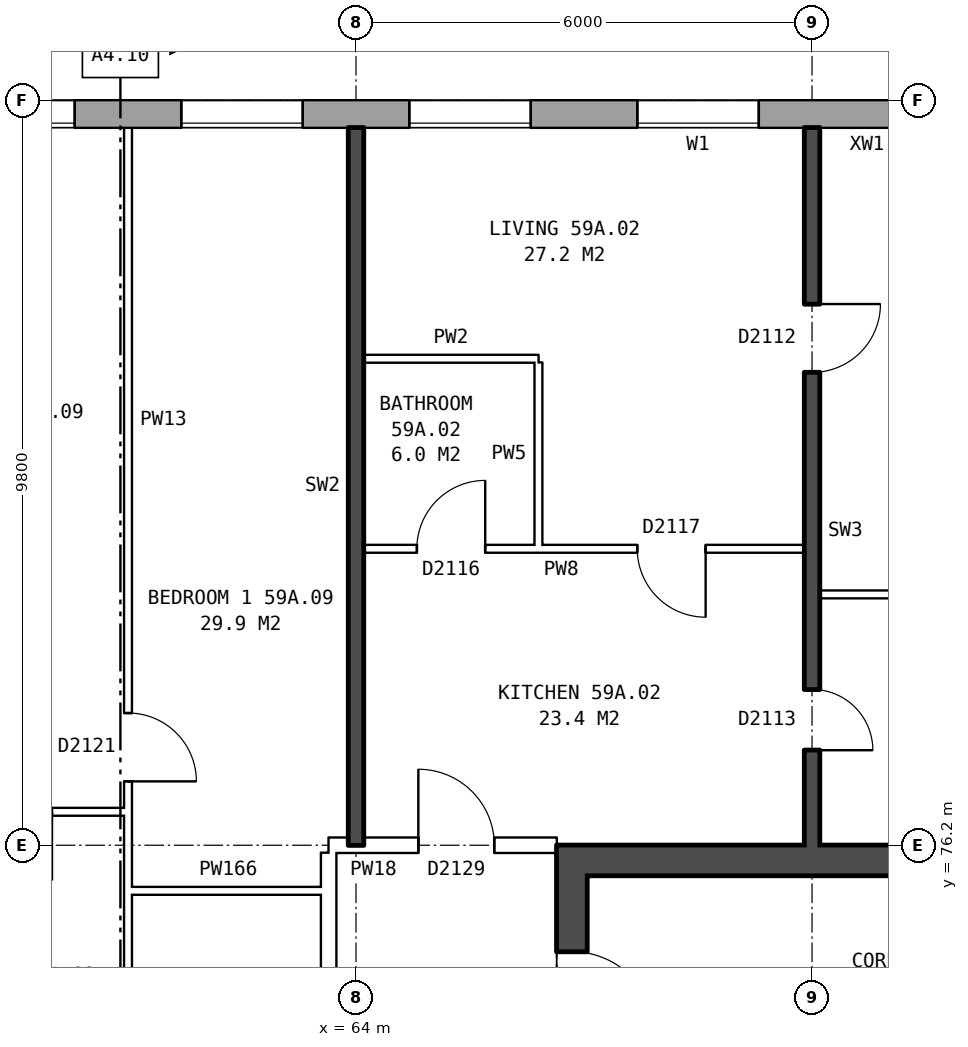
"""IFC4 building model, lengths in metres.
Left out: names, types, materials, properties, quantities, classifications, styles, units other than length and angle.
Written with IfcOpenShell. Run it as: python <this file> out.ifc"""

import sys

from ifc_helpers import new_model, si_unit, direction, frame, frame_2d, origin, place, context, subcontext, project, spatial, rectangle, extrude, element, fill, save


model = new_model("IFC4")
c1 = context("Model", 3, precision=1e-05, world=origin(), true_north=direction((0.0, 1.0)))
c2 = subcontext(c1, "Body", "Model", "MODEL_VIEW")
j1 = project(units=[si_unit("LENGTHUNIT", "METRE"), si_unit("PLANEANGLEUNIT", "RADIAN")], contexts=[c1])
p1 = place(None, origin())
s1 = spatial("IfcSite", under=j1, at=p1, CompositionType="ELEMENT")
p2 = place(p1, origin())
s2 = spatial("IfcBuilding", under=s1, at=p2, CompositionType="ELEMENT")
p3 = place(p2, frame((0.0, 0.0, 209.0)))
s3 = spatial("IfcBuildingStorey", under=s2, at=p3, CompositionType="ELEMENT", Elevation=209.0)
p4 = place(p3, frame((74.95, 85.82, 0.0), z_axis=(0.0, 0.0, 1.0), x_axis=(-1.0, 0.0, 0.0)))
e1 = element("IfcWall", 1, at=p4, inside=s3, PredefinedType="STANDARD", context=c2, shape_type="SweptSolid", body=[
    extrude(rectangle(XDim=39.875, YDim=0.36, at=frame_2d((19.938, 0.0))), origin(), (0.0, 0.0, 1.0), 2.85),
])
p5 = place(p4, frame((0.3, 0.0, 0.8)))
e2 = element("IfcOpeningElement", 2, at=p5, cuts=e1, PredefinedType="OPENING", context=c2, shape_type="SweptSolid", body=[
    extrude(rectangle(XDim=0.8, YDim=1.5, at=frame_2d((0.4, 0.75))), frame((0.0, 0.19, 0.0), z_axis=(0.0, -1.0, 0.0), x_axis=(1.0, 0.0, 0.0)), (0.0, 0.0, 1.0), 0.38),
])
p6 = place(p4, frame((5.65, 0.0, 0.8)))
e3 = element("IfcOpeningElement", 3, at=p6, cuts=e1, PredefinedType="OPENING", context=c2, shape_type="SweptSolid", body=[
    extrude(rectangle(XDim=1.6, YDim=1.8, at=frame_2d((0.8, 0.9))), frame((0.0, 0.19, 0.0), z_axis=(0.0, -1.0, 0.0), x_axis=(1.0, 0.0, 0.0)), (0.0, 0.0, 1.0), 0.38),
])
p7 = place(p4, frame((8.65, 0.0, 0.8)))
e4 = element("IfcOpeningElement", 4, at=p7, cuts=e1, PredefinedType="OPENING", context=c2, shape_type="SweptSolid", body=[
    extrude(rectangle(XDim=1.6, YDim=1.8, at=frame_2d((0.8, 0.9))), frame((0.0, 0.19, 0.0), z_axis=(0.0, -1.0, 0.0), x_axis=(1.0, 0.0, 0.0)), (0.0, 0.0, 1.0), 0.38),
])
p8 = place(p4, frame((11.65, 0.0, 0.8)))
e5 = element("IfcOpeningElement", 5, at=p8, cuts=e1, PredefinedType="OPENING", context=c2, shape_type="SweptSolid", body=[
    extrude(rectangle(XDim=1.6, YDim=1.8, at=frame_2d((0.8, 0.9))), frame((0.0, 0.19, 0.0), z_axis=(0.0, -1.0, 0.0), x_axis=(1.0, 0.0, 0.0)), (0.0, 0.0, 1.0), 0.38),
])
p9 = place(p4, frame((14.65, 0.0, 0.8)))
e6 = element("IfcOpeningElement", 6, at=p9, cuts=e1, PredefinedType="OPENING", context=c2, shape_type="SweptSolid", body=[
    extrude(rectangle(XDim=1.6, YDim=1.8, at=frame_2d((0.8, 0.9))), frame((0.0, 0.19, 0.0), z_axis=(0.0, -1.0, 0.0), x_axis=(1.0, 0.0, 0.0)), (0.0, 0.0, 1.0), 0.38),
])
p10 = place(p4, frame((17.65, 0.0, 0.8)))
e7 = element("IfcOpeningElement", 7, at=p10, cuts=e1, PredefinedType="OPENING", context=c2, shape_type="SweptSolid", body=[
    extrude(rectangle(XDim=1.6, YDim=1.8, at=frame_2d((0.8, 0.9))), frame((0.0, 0.19, 0.0), z_axis=(0.0, -1.0, 0.0), x_axis=(1.0, 0.0, 0.0)), (0.0, 0.0, 1.0), 0.38),
])
p11 = place(p4, frame((20.65, 0.0, 0.8)))
e8 = element("IfcOpeningElement", 8, at=p11, cuts=e1, PredefinedType="OPENING", context=c2, shape_type="SweptSolid", body=[
    extrude(rectangle(XDim=1.6, YDim=1.8, at=frame_2d((0.8, 0.9))), frame((0.0, 0.19, 0.0), z_axis=(0.0, -1.0, 0.0), x_axis=(1.0, 0.0, 0.0)), (0.0, 0.0, 1.0), 0.38),
])
p12 = place(p4, frame((23.65, 0.0, 0.8)))
e9 = element("IfcOpeningElement", 9, at=p12, cuts=e1, PredefinedType="OPENING", context=c2, shape_type="SweptSolid", body=[
    extrude(rectangle(XDim=1.6, YDim=1.8, at=frame_2d((0.8, 0.9))), frame((0.0, 0.19, 0.0), z_axis=(0.0, -1.0, 0.0), x_axis=(1.0, 0.0, 0.0)), (0.0, 0.0, 1.0), 0.38),
])
p13 = place(p4, frame((26.65, 0.0, 0.8)))
e10 = element("IfcOpeningElement", 10, at=p13, cuts=e1, PredefinedType="OPENING", context=c2, shape_type="SweptSolid", body=[
    extrude(rectangle(XDim=1.6, YDim=1.8, at=frame_2d((0.8, 0.9))), frame((0.0, 0.19, 0.0), z_axis=(0.0, -1.0, 0.0), x_axis=(1.0, 0.0, 0.0)), (0.0, 0.0, 1.0), 0.38),
])
p14 = place(p4, frame((29.65, 0.0, 0.8)))
e11 = element("IfcOpeningElement", 11, at=p14, cuts=e1, PredefinedType="OPENING", context=c2, shape_type="SweptSolid", body=[
    extrude(rectangle(XDim=1.6, YDim=1.8, at=frame_2d((0.8, 0.9))), frame((0.0, 0.19, 0.0), z_axis=(0.0, -1.0, 0.0), x_axis=(1.0, 0.0, 0.0)), (0.0, 0.0, 1.0), 0.38),
])
p15 = place(p4, frame((32.65, 0.0, 0.8)))
e12 = element("IfcOpeningElement", 12, at=p15, cuts=e1, PredefinedType="OPENING", context=c2, shape_type="SweptSolid", body=[
    extrude(rectangle(XDim=1.6, YDim=1.8, at=frame_2d((0.8, 0.9))), frame((0.0, 0.19, 0.0), z_axis=(0.0, -1.0, 0.0), x_axis=(1.0, 0.0, 0.0)), (0.0, 0.0, 1.0), 0.38),
])
p16 = place(p4, frame((35.15, 0.0, 0.8)))
e13 = element("IfcOpeningElement", 13, at=p16, cuts=e1, PredefinedType="OPENING", context=c2, shape_type="SweptSolid", body=[
    extrude(rectangle(XDim=1.0, YDim=1.8, at=frame_2d((0.5, 0.9))), frame((0.0, 0.19, 0.0), z_axis=(0.0, -1.0, 0.0), x_axis=(1.0, 0.0, 0.0)), (0.0, 0.0, 1.0), 0.38),
])
p17 = place(p4, frame((1.4, 0.0, 0.8)))
e14 = element("IfcOpeningElement", 14, at=p17, cuts=e1, PredefinedType="OPENING", context=c2, shape_type="SweptSolid", body=[
    extrude(rectangle(XDim=1.4, YDim=1.8, at=frame_2d((0.7, 0.9))), frame((0.0, 0.19, 0.0), z_axis=(0.0, -1.0, 0.0), x_axis=(1.0, 0.0, 0.0)), (0.0, 0.0, 1.0), 0.38),
])
p18 = place(p4, frame((38.55, 0.0, 0.8)))
e15 = element("IfcOpeningElement", 15, at=p18, cuts=e1, PredefinedType="OPENING", context=c2, shape_type="SweptSolid", body=[
    extrude(rectangle(XDim=1.0, YDim=1.8, at=frame_2d((0.5, 0.9))), frame((0.0, 0.19, 0.0), z_axis=(0.0, -1.0, 0.0), x_axis=(1.0, 0.0, 0.0)), (0.0, 0.0, 1.0), 0.38),
])
p19 = place(p3, frame((66.84, 63.8, 0.0), z_axis=(0.0, 0.0, 1.0), x_axis=(0.0, 1.0, 0.0)))
e16 = element("IfcWall", 16, at=p19, inside=s3, PredefinedType="SHEAR", context=c2, shape_type="SweptSolid", body=[
    extrude(rectangle(XDim=12.4, YDim=0.4, at=frame_2d((6.2, 0.0))), origin(), (0.0, 0.0, 1.0), 2.85),
])
p20 = place(p19, frame((1.325, 0.0, 0.0)))
e17 = element("IfcOpeningElement", 17, at=p20, cuts=e16, PredefinedType="OPENING", context=c2, shape_type="SweptSolid", body=[
    extrude(rectangle(XDim=1.1, YDim=2.1, at=frame_2d((0.55, 1.05))), frame((0.0, 0.21, 0.0), z_axis=(0.0, -1.0, 0.0), x_axis=(1.0, 0.0, 0.0)), (0.0, 0.0, 1.0), 0.42),
])
p21 = place(p19, frame((3.6, 0.0, 0.0)))
e18 = element("IfcOpeningElement", 18, at=p21, cuts=e16, PredefinedType="OPENING", context=c2, shape_type="SweptSolid", body=[
    extrude(rectangle(XDim=1.1, YDim=2.1, at=frame_2d((0.55, 1.05))), frame((0.0, 0.21, 0.0), z_axis=(0.0, -1.0, 0.0), x_axis=(1.0, 0.0, 0.0)), (0.0, 0.0, 1.0), 0.42),
])
p22 = place(p19, frame((5.8, 0.0, 0.0)))
e19 = element("IfcOpeningElement", 19, at=p22, cuts=e16, PredefinedType="OPENING", context=c2, shape_type="SweptSolid", body=[
    extrude(rectangle(XDim=1.1, YDim=2.1, at=frame_2d((0.55, 1.05))), frame((0.0, 0.21, 0.0), z_axis=(0.0, -1.0, 0.0), x_axis=(1.0, 0.0, 0.0)), (0.0, 0.0, 1.0), 0.42),
])
p23 = place(p19, frame((8.0, 0.0, 0.0)))
e20 = element("IfcOpeningElement", 20, at=p23, cuts=e16, PredefinedType="OPENING", context=c2, shape_type="SweptSolid", body=[
    extrude(rectangle(XDim=1.1, YDim=2.1, at=frame_2d((0.55, 1.05))), frame((0.0, 0.21, 0.0), z_axis=(0.0, -1.0, 0.0), x_axis=(1.0, 0.0, 0.0)), (0.0, 0.0, 1.0), 0.42),
])
p24 = place(p19, frame((9.9, 0.0, 0.0)))
e21 = element("IfcOpeningElement", 21, at=p24, cuts=e16, PredefinedType="OPENING", context=c2, shape_type="SweptSolid", body=[
    extrude(rectangle(XDim=1.1, YDim=2.1, at=frame_2d((0.55, 1.05))), frame((0.0, 0.21, 0.0), z_axis=(0.0, -1.0, 0.0), x_axis=(1.0, 0.0, 0.0)), (0.0, 0.0, 1.0), 0.42),
])
p25 = place(p3, frame((67.04, 76.0, 0.0), z_axis=(0.0, 0.0, 1.0), x_axis=(1.0, 0.0, 0.0)))
e22 = element("IfcWall", 22, at=p25, inside=s3, PredefinedType="SHEAR", context=c2, shape_type="SweptSolid", body=[
    extrude(rectangle(XDim=8.2, YDim=0.4, at=frame_2d((4.1, 0.0))), origin(), (0.0, 0.0, 1.0), 2.85),
])
p26 = place(p3, frame((63.64, 63.9, 0.0), z_axis=(0.0, 0.0, 1.0), x_axis=(0.0, 1.0, 0.0)))
e23 = element("IfcWall", 23, at=p26, inside=s3, PredefinedType="PARTITIONING", context=c2, shape_type="SweptSolid", body=[
    extrude(rectangle(XDim=12.2, YDim=0.2, at=frame_2d((6.1, 0.0))), origin(), (0.0, 0.0, 1.0), 2.85),
])
p27 = place(p26, frame((5.1, 0.0, 0.0)))
e24 = element("IfcOpeningElement", 24, at=p27, cuts=e23, PredefinedType="OPENING", context=c2, shape_type="SweptSolid", body=[
    extrude(rectangle(XDim=2.0, YDim=2.1, at=frame_2d((1.0, 1.05))), frame((0.0, 0.11, 0.0), z_axis=(0.0, -1.0, 0.0), x_axis=(1.0, 0.0, 0.0)), (0.0, 0.0, 1.0), 0.22),
])
p28 = place(p3, frame((61.0, 75.6, 0.0), z_axis=(0.0, 0.0, 1.0), x_axis=(1.0, 0.0, 0.0)))
e25 = element("IfcWall", 25, at=p28, inside=s3, PredefinedType="PARTITIONING", context=c2, shape_type="SweptSolid", body=[
    extrude(rectangle(XDim=2.64, YDim=0.1, at=frame_2d((1.32, 0.0))), origin(), (0.0, 0.0, 1.0), 2.85),
])
p29 = place(p3, frame((63.64, 76.2, 0.0), z_axis=(0.0, 0.0, 1.0), x_axis=(1.0, 0.0, 0.0)))
e26 = element("IfcWall", 26, at=p29, inside=s3, PredefinedType="PARTITIONING", context=c2, shape_type="SweptSolid", body=[
    extrude(rectangle(XDim=3.0, YDim=0.2, at=frame_2d((1.5, 0.0))), origin(), (0.0, 0.0, 1.0), 2.85),
])
p30 = place(p29, frame((1.18, 0.0, 0.0)))
e27 = element("IfcOpeningElement", 27, at=p30, cuts=e26, PredefinedType="OPENING", context=c2, shape_type="SweptSolid", body=[
    extrude(rectangle(XDim=1.0, YDim=2.1, at=frame_2d((0.5, 1.05))), frame((0.0, 0.11, 0.0), z_axis=(0.0, -1.0, 0.0), x_axis=(1.0, 0.0, 0.0)), (0.0, 0.0, 1.0), 0.22),
])
p31 = place(p3, frame((58.1, 76.64, 0.0), z_axis=(0.0, 0.0, 1.0), x_axis=(1.0, 0.0, 0.0)))
e28 = element("IfcWall", 28, at=p31, inside=s3, PredefinedType="PARTITIONING", context=c2, shape_type="SweptSolid", body=[
    extrude(rectangle(XDim=2.9, YDim=0.1, at=frame_2d((1.45, 0.0))), origin(), (0.0, 0.0, 1.0), 2.85),
])
p32 = place(p31, frame((1.0, 0.0, 0.0)))
e29 = element("IfcOpeningElement", 29, at=p32, cuts=e28, PredefinedType="OPENING", context=c2, shape_type="SweptSolid", body=[
    extrude(rectangle(XDim=0.9, YDim=2.1, at=frame_2d((0.45, 1.05))), frame((0.0, 0.06, 0.0), z_axis=(0.0, -1.0, 0.0), x_axis=(1.0, 0.0, 0.0)), (0.0, 0.0, 1.0), 0.12),
])
p33 = place(p3, frame((70.1, 79.5, 0.0), z_axis=(0.0, 0.0, 1.0), x_axis=(1.0, 0.0, 0.0)))
e30 = element("IfcWall", 30, at=p33, inside=s3, PredefinedType="PARTITIONING", context=c2, shape_type="SweptSolid", body=[
    extrude(rectangle(XDim=5.8, YDim=0.1, at=frame_2d((2.9, 0.0))), origin(), (0.0, 0.0, 1.0), 2.85),
])
p34 = place(p3, frame((64.1, 80.1, 0.0), z_axis=(0.0, 0.0, 1.0), x_axis=(1.0, 0.0, 0.0)))
e31 = element("IfcWall", 31, at=p34, inside=s3, PredefinedType="PARTITIONING", context=c2, shape_type="SweptSolid", body=[
    extrude(rectangle(XDim=5.8, YDim=0.1, at=frame_2d((2.9, 0.0))), origin(), (0.0, 0.0, 1.0), 2.85),
])
p35 = place(p34, frame((3.6, 0.0, 0.0)))
e32 = element("IfcOpeningElement", 32, at=p35, cuts=e31, PredefinedType="OPENING", context=c2, shape_type="SweptSolid", body=[
    extrude(rectangle(XDim=0.9, YDim=2.1, at=frame_2d((0.45, 1.05))), frame((0.0, 0.06, 0.0), z_axis=(0.0, -1.0, 0.0), x_axis=(1.0, 0.0, 0.0)), (0.0, 0.0, 1.0), 0.12),
])
p36 = place(p34, frame((0.7, 0.0, 0.0)))
e33 = element("IfcOpeningElement", 33, at=p36, cuts=e31, PredefinedType="OPENING", context=c2, shape_type="SweptSolid", body=[
    extrude(rectangle(XDim=0.9, YDim=2.1, at=frame_2d((0.45, 1.05))), frame((0.0, 0.06, 0.0), z_axis=(0.0, -1.0, 0.0), x_axis=(1.0, 0.0, 0.0)), (0.0, 0.0, 1.0), 0.12),
])
p37 = place(p3, frame((64.1, 82.6, 0.0), z_axis=(0.0, 0.0, 1.0), x_axis=(1.0, 0.0, 0.0)))
e34 = element("IfcWall", 34, at=p37, inside=s3, PredefinedType="PARTITIONING", context=c2, shape_type="SweptSolid", body=[
    extrude(rectangle(XDim=2.3, YDim=0.1, at=frame_2d((1.15, 0.0))), origin(), (0.0, 0.0, 1.0), 2.85),
])
p38 = place(p3, frame((61.0, 71.3, 0.0), z_axis=(0.0, 0.0, 1.0), x_axis=(0.0, 1.0, 0.0)))
e35 = element("IfcWall", 35, at=p38, inside=s3, PredefinedType="PARTITIONING", context=c2, shape_type="SweptSolid", body=[
    extrude(rectangle(XDim=14.34, YDim=0.1, at=frame_2d((7.17, 0.0))), origin(), (0.0, 0.0, 1.0), 2.85),
])
p39 = place(p38, frame((5.74, 0.0, 0.0)))
e36 = element("IfcOpeningElement", 36, at=p39, cuts=e35, PredefinedType="OPENING", context=c2, shape_type="SweptSolid", body=[
    extrude(rectangle(XDim=0.9, YDim=2.1, at=frame_2d((0.45, 1.05))), frame((0.0, 0.06, 0.0), z_axis=(0.0, -1.0, 0.0), x_axis=(1.0, 0.0, 0.0)), (0.0, 0.0, 1.0), 0.12),
])
p40 = place(p38, frame((0.4, 0.0, 0.0)))
e37 = element("IfcOpeningElement", 37, at=p40, cuts=e35, PredefinedType="OPENING", context=c2, shape_type="SweptSolid", body=[
    extrude(rectangle(XDim=0.9, YDim=2.1, at=frame_2d((0.45, 1.05))), frame((0.0, 0.06, 0.0), z_axis=(0.0, -1.0, 0.0), x_axis=(1.0, 0.0, 0.0)), (0.0, 0.0, 1.0), 0.12),
])
p41 = place(p3, frame((64.0, 76.2, 0.0), z_axis=(0.0, 0.0, 1.0), x_axis=(0.0, 1.0, 0.0)))
e38 = element("IfcWall", 38, at=p41, inside=s3, PredefinedType="SOLIDWALL", context=c2, shape_type="SweptSolid", body=[
    extrude(rectangle(XDim=9.44, YDim=0.2, at=frame_2d((4.72, 0.0))), origin(), (0.0, 0.0, 1.0), 2.85),
])
p42 = place(p3, frame((66.4, 80.15, 0.0), z_axis=(0.0, 0.0, 1.0), x_axis=(0.0, 1.0, 0.0)))
e39 = element("IfcWall", 39, at=p42, inside=s3, PredefinedType="PARTITIONING", context=c2, shape_type="SweptSolid", body=[
    extrude(rectangle(XDim=2.4, YDim=0.1, at=frame_2d((1.2, 0.0))), origin(), (0.0, 0.0, 1.0), 2.85),
])
p43 = place(p3, frame((70.0, 76.2, 0.0), z_axis=(0.0, 0.0, 1.0), x_axis=(0.0, 1.0, 0.0)))
e40 = element("IfcWall", 40, at=p43, inside=s3, PredefinedType="SOLIDWALL", context=c2, shape_type="SweptSolid", body=[
    extrude(rectangle(XDim=9.44, YDim=0.2, at=frame_2d((4.72, 0.0))), origin(), (0.0, 0.0, 1.0), 2.85),
])
p44 = place(p43, frame((6.22, 0.0, 0.0)))
e41 = element("IfcOpeningElement", 41, at=p44, cuts=e40, PredefinedType="OPENING", context=c2, shape_type="SweptSolid", body=[
    extrude(rectangle(XDim=0.9, YDim=2.1, at=frame_2d((0.45, 1.05))), frame((0.0, 0.11, 0.0), z_axis=(0.0, -1.0, 0.0), x_axis=(1.0, 0.0, 0.0)), (0.0, 0.0, 1.0), 0.22),
])
p45 = place(p43, frame((1.25, 0.0, 0.0)))
e42 = element("IfcOpeningElement", 42, at=p45, cuts=e40, PredefinedType="OPENING", context=c2, shape_type="SweptSolid", body=[
    extrude(rectangle(XDim=0.8, YDim=2.1, at=frame_2d((0.4, 1.05))), frame((0.0, 0.11, 0.0), z_axis=(0.0, -1.0, 0.0), x_axis=(1.0, 0.0, 0.0)), (0.0, 0.0, 1.0), 0.22),
])
p46 = place(p6, origin())
e43 = element("IfcWindow", 43, at=p46, inside=s3, PartitioningType="SINGLE_PANEL", PredefinedType="WINDOW", context=c2, shape_type="SweptSolid", body=[
    extrude(rectangle(XDim=1.6, YDim=1.8, at=frame_2d((0.8, 0.9))), frame((0.0, 0.15, 0.0), z_axis=(0.0, -1.0, 0.0), x_axis=(1.0, 0.0, 0.0)), (0.0, 0.0, 1.0), 0.06),
])
fill(e3, e43)
p47 = place(p7, origin())
e44 = element("IfcWindow", 44, at=p47, inside=s3, PartitioningType="SINGLE_PANEL", PredefinedType="WINDOW", context=c2, shape_type="SweptSolid", body=[
    extrude(rectangle(XDim=1.6, YDim=1.8, at=frame_2d((0.8, 0.9))), frame((0.0, 0.15, 0.0), z_axis=(0.0, -1.0, 0.0), x_axis=(1.0, 0.0, 0.0)), (0.0, 0.0, 1.0), 0.06),
])
fill(e4, e44)
p48 = place(p8, origin())
e45 = element("IfcWindow", 45, at=p48, inside=s3, PartitioningType="SINGLE_PANEL", PredefinedType="WINDOW", context=c2, shape_type="SweptSolid", body=[
    extrude(rectangle(XDim=1.6, YDim=1.8, at=frame_2d((0.8, 0.9))), frame((0.0, 0.15, 0.0), z_axis=(0.0, -1.0, 0.0), x_axis=(1.0, 0.0, 0.0)), (0.0, 0.0, 1.0), 0.06),
])
fill(e5, e45)
p49 = place(p9, origin())
e46 = element("IfcWindow", 46, at=p49, inside=s3, PartitioningType="SINGLE_PANEL", PredefinedType="WINDOW", context=c2, shape_type="SweptSolid", body=[
    extrude(rectangle(XDim=1.6, YDim=1.8, at=frame_2d((0.8, 0.9))), frame((0.0, 0.15, 0.0), z_axis=(0.0, -1.0, 0.0), x_axis=(1.0, 0.0, 0.0)), (0.0, 0.0, 1.0), 0.06),
])
fill(e6, e46)
p50 = place(p24, frame((1.1, 0.0, 0.0), z_axis=(0.0, 0.0, 1.0), x_axis=(-1.0, 0.0, 0.0)))
e47 = element("IfcDoor", 47, at=p50, inside=s3, OperationType="SINGLE_SWING_RIGHT", PredefinedType="DOOR", context=c2, shape_type="SweptSolid", body=[
    extrude(rectangle(XDim=1.1, YDim=2.1, at=frame_2d((0.55, 1.05))), frame((0.0, 0.185, 0.0), z_axis=(0.0, -1.0, 0.0), x_axis=(1.0, 0.0, 0.0)), (0.0, 0.0, 1.0), 0.05),
])
fill(e21, e47)
p51 = place(p44, frame((0.9, 0.0, 0.0), z_axis=(0.0, 0.0, 1.0), x_axis=(-1.0, 0.0, 0.0)))
e48 = element("IfcDoor", 48, at=p51, inside=s3, OperationType="SINGLE_SWING_LEFT", PredefinedType="DOOR", context=c2, shape_type="SweptSolid", body=[
    extrude(rectangle(XDim=0.9, YDim=2.1, at=frame_2d((0.45, 1.05))), frame((0.0, 0.025, 0.0), z_axis=(0.0, -1.0, 0.0), x_axis=(1.0, 0.0, 0.0)), (0.0, 0.0, 1.0), 0.05),
])
fill(e41, e48)
p52 = place(p30, origin())
e49 = element("IfcDoor", 49, at=p52, inside=s3, OperationType="SINGLE_SWING_LEFT", PredefinedType="DOOR", context=c2, shape_type="SweptSolid", body=[
    extrude(rectangle(XDim=1.0, YDim=2.1, at=frame_2d((0.5, 1.05))), frame((0.0, 0.025, 0.0), z_axis=(0.0, -1.0, 0.0), x_axis=(1.0, 0.0, 0.0)), (0.0, 0.0, 1.0), 0.05),
])
fill(e27, e49)
p53 = place(p35, frame((0.9, 0.0, 0.0), z_axis=(0.0, 0.0, 1.0), x_axis=(-1.0, 0.0, 0.0)))
e50 = element("IfcDoor", 50, at=p53, inside=s3, OperationType="SINGLE_SWING_LEFT", PredefinedType="DOOR", context=c2, shape_type="SweptSolid", body=[
    extrude(rectangle(XDim=0.9, YDim=2.1, at=frame_2d((0.45, 1.05))), frame((0.0, 0.025, 0.0), z_axis=(0.0, -1.0, 0.0), x_axis=(1.0, 0.0, 0.0)), (0.0, 0.0, 1.0), 0.05),
])
fill(e32, e50)
p54 = place(p45, frame((0.8, 0.0, 0.0), z_axis=(0.0, 0.0, 1.0), x_axis=(-1.0, 0.0, 0.0)))
e51 = element("IfcDoor", 51, at=p54, inside=s3, OperationType="SINGLE_SWING_RIGHT", PredefinedType="DOOR", context=c2, shape_type="SweptSolid", body=[
    extrude(rectangle(XDim=0.8, YDim=2.1, at=frame_2d((0.4, 1.05))), frame((0.0, 0.025, 0.0), z_axis=(0.0, -1.0, 0.0), x_axis=(1.0, 0.0, 0.0)), (0.0, 0.0, 1.0), 0.05),
])
fill(e42, e51)
p55 = place(p36, origin())
e52 = element("IfcDoor", 52, at=p55, inside=s3, OperationType="SINGLE_SWING_RIGHT", PredefinedType="DOOR", context=c2, shape_type="SweptSolid", body=[
    extrude(rectangle(XDim=0.9, YDim=2.1, at=frame_2d((0.45, 1.05))), frame((0.0, 0.025, 0.0), z_axis=(0.0, -1.0, 0.0), x_axis=(1.0, 0.0, 0.0)), (0.0, 0.0, 1.0), 0.05),
])
fill(e33, e52)
p56 = place(p39, frame((0.9, 0.0, 0.0), z_axis=(0.0, 0.0, 1.0), x_axis=(-1.0, 0.0, 0.0)))
e53 = element("IfcDoor", 53, at=p56, inside=s3, OperationType="SINGLE_SWING_RIGHT", PredefinedType="DOOR", context=c2, shape_type="SweptSolid", body=[
    extrude(rectangle(XDim=0.9, YDim=2.1, at=frame_2d((0.45, 1.05))), frame((0.0, 0.025, 0.0), z_axis=(0.0, -1.0, 0.0), x_axis=(1.0, 0.0, 0.0)), (0.0, 0.0, 1.0), 0.05),
])
fill(e36, e53)
save(model, sys.argv[1])
